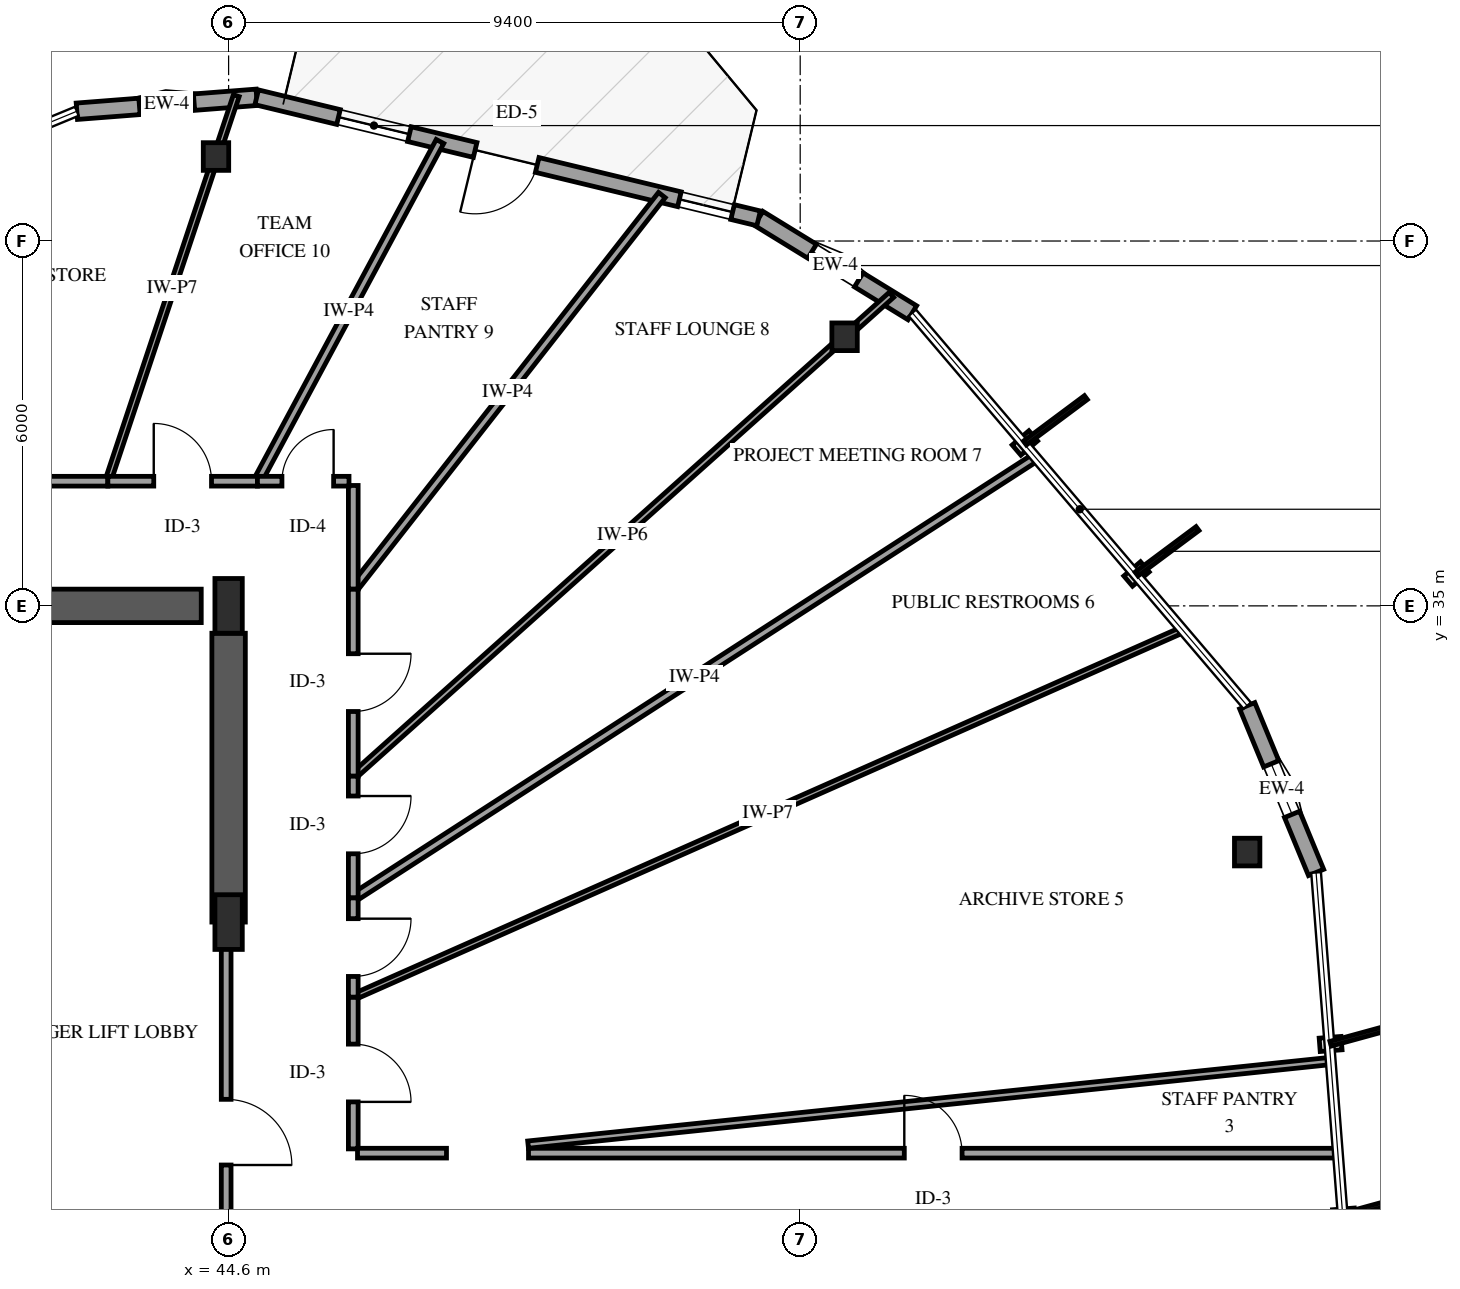
"""IFC4 building model, lengths in metres.
Left out: names, types, materials, properties, quantities, classifications, styles, units other than length and angle.
Written with IfcOpenShell. Run it as: python <this file> out.ifc"""

import sys

from ifc_helpers import new_model, si_unit, direction, frame, frame_2d, origin, origin_2d, place, context, subcontext, project, spatial, rectangle, i_section, extrude, element, fill, save


model = new_model("IFC4")
c1 = context("Model", 3, precision=1e-05, world=origin(), true_north=direction((0.0, 1.0)))
c2 = subcontext(c1, "Body", "Model", "MODEL_VIEW")
j1 = project(units=[si_unit("LENGTHUNIT", "METRE"), si_unit("PLANEANGLEUNIT", "RADIAN")], contexts=[c1])
p1 = place(None, origin())
s1 = spatial("IfcSite", under=j1, at=p1, CompositionType="ELEMENT")
p2 = place(p1, origin())
s2 = spatial("IfcBuilding", under=s1, at=p2, CompositionType="ELEMENT")
p3 = place(p2, frame((0.0, 0.0, 114.7)))
s3 = spatial("IfcBuildingStorey", under=s2, at=p3, CompositionType="ELEMENT", Elevation=114.7)
p4 = place(p3, frame((41.3, 35.0, 0.0), z_axis=(0.0, 0.0, 1.0), x_axis=(1.0, 0.0, 0.0)))
e1 = element("IfcWall", 1, at=p4, inside=s3, PredefinedType="SHEAR", context=c2, shape_type="SweptSolid", body=[
    extrude(rectangle(XDim=2.85, YDim=0.55, at=frame_2d((1.425, 0.0))), origin(), (0.0, 0.0, 1.0), 3.9),
])
p5 = place(p3, frame((44.6, 29.8, 0.0), z_axis=(0.0, 0.0, 1.0), x_axis=(0.0, 1.0, 0.0)))
e2 = element("IfcWall", 2, at=p5, inside=s3, PredefinedType="SHEAR", context=c2, shape_type="SweptSolid", body=[
    extrude(rectangle(XDim=4.75, YDim=0.55, at=frame_2d((2.375, 0.0))), origin(), (0.0, 0.0, 1.0), 3.9),
])
for number, where, z_axis, x_axis in (
    (3, (44.6, 29.8, 0.0), (0.0, 0.0, 1.0), (1.0, 0.0, 0.0)),
    (4, (44.6, 35.0, 0.0), (0.0, 0.0, 1.0), (1.0, 0.0, 0.0)),
):
    element("IfcColumn", number, at=place(p3, frame(where, z_axis=z_axis, x_axis=x_axis)), inside=s3, PredefinedType="PILASTER", context=c2, shape_type="SweptSolid", body=[
        extrude(rectangle(XDim=0.45, YDim=0.9, at=origin_2d()), origin(), (0.0, 0.0, 1.0), 3.9),
    ])
for number, where, z_axis, x_axis in (
    (5, (61.351, 30.951, 0.0), (0.0, 0.0, 1.0), (1.0, 0.0, 0.0)),
    (6, (54.73, 39.425, 0.0), (0.0, 0.0, 1.0), (1.0, 0.0, 0.0)),
    (7, (44.393, 42.389, 0.0), (0.0, 0.0, 1.0), (1.0, 0.0, 0.0)),
):
    element("IfcColumn", number, at=place(p3, frame(where, z_axis=z_axis, x_axis=x_axis)), inside=s3, PredefinedType="COLUMN", context=c2, shape_type="SweptSolid", body=[
        extrude(i_section(OverallWidth=0.418, OverallDepth=0.455, WebThickness=0.042, FlangeThickness=0.068, FilletRadius=0.038, at=origin_2d()), origin(), (0.0, 0.0, 1.0), 3.9),
    ])
p6 = place(p3, frame((55.844, 39.82, 0.0), z_axis=(0.0, 0.0, 1.0), x_axis=(-0.852087521371, 0.523399327402, 0.0)))
e8 = element("IfcWall", 8, at=p6, inside=s3, PredefinedType="SOLIDWALL", context=c2, shape_type="SweptSolid", body=[
    extrude(rectangle(XDim=2.967, YDim=0.27, at=frame_2d((1.483, 0.0))), origin(), (0.0, 0.0, 1.0), 2.979),
])
p7 = place(p6, frame((1.033, 0.0, 0.75)))
e9 = element("IfcOpeningElement", 9, at=p7, cuts=e8, PredefinedType="OPENING", context=c2, shape_type="SweptSolid", body=[
    extrude(rectangle(XDim=0.9, YDim=1.5, at=frame_2d((0.45, 0.75))), frame((0.0, 0.145, 0.0), z_axis=(0.0, -1.0, 0.0), x_axis=(1.0, 0.0, 0.0)), (0.0, 0.0, 1.0), 0.29),
])
p8 = place(p3, frame((45.062, 43.364, 0.0), z_axis=(0.0, 0.0, 1.0), x_axis=(-0.99699708695, -0.077439063873, 0.0)))
e10 = element("IfcWall", 10, at=p8, inside=s3, PredefinedType="SOLIDWALL", context=c2, shape_type="SweptSolid", body=[
    extrude(rectangle(XDim=2.967, YDim=0.27, at=frame_2d((1.483, 0.0))), origin(), (0.0, 0.0, 1.0), 2.979),
])
p9 = place(p8, frame((1.033, 0.0, 0.75)))
e11 = element("IfcOpeningElement", 11, at=p9, cuts=e10, PredefinedType="OPENING", context=c2, shape_type="SweptSolid", body=[
    extrude(rectangle(XDim=0.9, YDim=1.5, at=frame_2d((0.45, 0.75))), frame((0.0, 0.145, 0.0), z_axis=(0.0, -1.0, 0.0), x_axis=(1.0, 0.0, 0.0)), (0.0, 0.0, 1.0), 0.29),
])
p10 = place(p3, frame((53.316, 41.373, 0.0), z_axis=(0.0, 0.0, 1.0), x_axis=(-0.972125162173, 0.234462511014, 0.0)))
e12 = element("IfcWall", 12, at=p10, inside=s3, PredefinedType="SOLIDWALL", context=c2, shape_type="SweptSolid", body=[
    extrude(rectangle(XDim=8.49, YDim=0.25, at=frame_2d((4.245, 0.0))), origin(), (0.0, 0.0, 1.0), 2.979),
])
p11 = place(p10, frame((3.745, 0.0, 0.0)))
e13 = element("IfcOpeningElement", 13, at=p11, cuts=e12, PredefinedType="OPENING", context=c2, shape_type="SweptSolid", body=[
    extrude(rectangle(XDim=1.05, YDim=2.15, at=frame_2d((0.525, 1.075))), frame((0.0, 0.135, 0.0), z_axis=(0.0, -1.0, 0.0), x_axis=(1.0, 0.0, 0.0)), (0.0, 0.0, 1.0), 0.27),
])
p12 = place(p10, frame((0.44, 0.0, 0.72)))
e14 = element("IfcOpeningElement", 14, at=p12, cuts=e12, PredefinedType="OPENING", context=c2, shape_type="SweptSolid", body=[
    extrude(rectangle(XDim=0.9, YDim=1.5, at=frame_2d((0.45, 0.75))), frame((0.0, 0.135, 0.0), z_axis=(0.0, -1.0, 0.0), x_axis=(1.0, 0.0, 0.0)), (0.0, 0.0, 1.0), 0.27),
])
p13 = place(p10, frame((5.907, 0.0, 0.72)))
e15 = element("IfcOpeningElement", 15, at=p13, cuts=e12, PredefinedType="OPENING", context=c2, shape_type="SweptSolid", body=[
    extrude(rectangle(XDim=1.2, YDim=1.6, at=frame_2d((0.6, 0.8))), frame((0.0, 0.135, 0.0), z_axis=(0.0, -1.0, 0.0), x_axis=(1.0, 0.0, 0.0)), (0.0, 0.0, 1.0), 0.27),
])
p14 = place(p3, frame((62.484, 30.616, 0.0), z_axis=(0.0, 0.0, 1.0), x_axis=(-0.381767795874, 0.9242582702, 0.0)))
e16 = element("IfcWall", 16, at=p14, inside=s3, PredefinedType="SOLIDWALL", context=c2, shape_type="SweptSolid", body=[
    extrude(rectangle(XDim=2.967, YDim=0.27, at=frame_2d((1.483, 0.0))), origin(), (0.0, 0.0, 1.0), 2.979),
])
p15 = place(p14, frame((1.033, 0.0, 0.75)))
e17 = element("IfcOpeningElement", 17, at=p15, cuts=e16, PredefinedType="OPENING", context=c2, shape_type="SweptSolid", body=[
    extrude(rectangle(XDim=0.9, YDim=1.5, at=frame_2d((0.45, 0.75))), frame((0.0, 0.145, 0.0), z_axis=(0.0, -1.0, 0.0), x_axis=(1.0, 0.0, 0.0)), (0.0, 0.0, 1.0), 0.29),
])
p16 = place(p3, frame((46.65, 28.566, 0.0), z_axis=(0.0, 0.0, 1.0), x_axis=(0.914342636825, 0.404941406234, 0.0)))
e18 = element("IfcWall", 18, at=p16, inside=s3, PredefinedType="PARTITIONING", context=c2, shape_type="SweptSolid", body=[
    extrude(rectangle(XDim=14.916, YDim=0.1, at=frame_2d((7.458, 0.0))), origin(), (0.0, 0.0, 1.0), 3.6),
])
p17 = place(p3, frame((46.65, 30.197, 0.0), z_axis=(0.0, 0.0, 1.0), x_axis=(0.840112606946, 0.542412027569, 0.0)))
e19 = element("IfcWall", 19, at=p17, inside=s3, PredefinedType="PARTITIONING", context=c2, shape_type="SweptSolid", body=[
    extrude(rectangle(XDim=13.357, YDim=0.14, at=frame_2d((6.678, 0.0))), origin(), (0.0, 0.0, 1.0), 3.6),
])
p18 = place(p3, frame((49.532, 26.0, 0.0), z_axis=(0.0, 0.0, 1.0), x_axis=(1.0, 0.0, 0.0)))
e20 = element("IfcWall", 20, at=p18, inside=s3, PredefinedType="PARTITIONING", context=c2, shape_type="SweptSolid", body=[
    extrude(rectangle(XDim=13.31, YDim=0.16, at=frame_2d((6.655, 0.0))), origin(), (0.0, 0.0, 1.0), 3.6),
])
p19 = place(p18, frame((6.18, 0.0, 0.0)))
e21 = element("IfcOpeningElement", 21, at=p19, cuts=e20, PredefinedType="OPENING", context=c2, shape_type="SweptSolid", body=[
    extrude(rectangle(XDim=0.95, YDim=2.15, at=frame_2d((0.475, 1.075))), frame((0.0, 0.09, 0.0), z_axis=(0.0, -1.0, 0.0), x_axis=(1.0, 0.0, 0.0)), (0.0, 0.0, 1.0), 0.18),
])
p20 = place(p3, frame((49.525, 26.14, 0.0), z_axis=(0.0, 0.0, 1.0), x_axis=(0.994608293381, 0.103703147192, 0.0)))
e22 = element("IfcWall", 22, at=p20, inside=s3, PredefinedType="PARTITIONING", context=c2, shape_type="SweptSolid", body=[
    extrude(rectangle(XDim=13.271, YDim=0.12, at=frame_2d((6.635, 0.0))), origin(), (0.0, 0.0, 1.0), 3.6),
])
p21 = place(p3, frame((46.65, 32.199, 0.0), z_axis=(0.0, 0.0, 1.0), x_axis=(0.745386497936, 0.666632558982, 0.0)))
e23 = element("IfcWall", 23, at=p21, inside=s3, PredefinedType="PARTITIONING", context=c2, shape_type="SweptSolid", body=[
    extrude(rectangle(XDim=11.873, YDim=0.11, at=frame_2d((5.937, 0.0))), origin(), (0.0, 0.0, 1.0), 2.978),
])
p22 = place(p3, frame((46.65, 35.277, 0.0), z_axis=(0.0, 0.0, 1.0), x_axis=(0.616660136887, 0.787229493588, 0.0)))
e24 = element("IfcWall", 24, at=p22, inside=s3, PredefinedType="PARTITIONING", context=c2, shape_type="SweptSolid", body=[
    extrude(rectangle(XDim=8.23, YDim=0.14, at=frame_2d((4.115, 0.0))), origin(), (0.0, 0.0, 1.0), 2.978),
])
p23 = place(p3, frame((44.56, 29.8, 0.0), z_axis=(0.0, 0.0, 1.0), x_axis=(0.0, -1.0, 0.0)))
e25 = element("IfcWall", 25, at=p23, inside=s3, PredefinedType="PARTITIONING", context=c2, shape_type="SweptSolid", body=[
    extrude(rectangle(XDim=6.91, YDim=0.16, at=frame_2d((3.455, 0.0))), origin(), (0.0, 0.0, 1.0), 2.64),
])
p24 = place(p23, frame((2.915, 0.0, 0.0)))
e26 = element("IfcOpeningElement", 26, at=p24, cuts=e25, PredefinedType="OPENING", context=c2, shape_type="SweptSolid", body=[
    extrude(rectangle(XDim=1.08, YDim=2.15, at=frame_2d((0.54, 1.075))), frame((0.0, 0.09, 0.0), z_axis=(0.0, -1.0, 0.0), x_axis=(1.0, 0.0, 0.0)), (0.0, 0.0, 1.0), 0.18),
])
p25 = place(p3, frame((42.614, 37.05, 0.0), z_axis=(0.0, 0.0, 1.0), x_axis=(0.316063354252, 0.948738086143, 0.0)))
e27 = element("IfcWall", 27, at=p25, inside=s3, PredefinedType="PARTITIONING", context=c2, shape_type="SweptSolid", body=[
    extrude(rectangle(XDim=6.682, YDim=0.1, at=frame_2d((3.341, 0.0))), origin(), (0.0, 0.0, 1.0), 2.895),
])
p26 = place(p3, frame((45.074, 37.05, 0.0), z_axis=(0.0, 0.0, 1.0), x_axis=(0.473319167136, 0.880891006891, 0.0)))
e28 = element("IfcWall", 28, at=p26, inside=s3, PredefinedType="PARTITIONING", context=c2, shape_type="SweptSolid", body=[
    extrude(rectangle(XDim=6.342, YDim=0.14, at=frame_2d((3.171, 0.0))), origin(), (0.0, 0.0, 1.0), 2.974),
])
p27 = place(p3, frame((38.324, 37.05, 0.0), z_axis=(0.0, 0.0, 1.0), x_axis=(1.0, 0.0, 0.0)))
e29 = element("IfcWall", 29, at=p27, inside=s3, PredefinedType="PARTITIONING", context=c2, shape_type="SweptSolid", body=[
    extrude(rectangle(XDim=4.29, YDim=0.16, at=frame_2d((2.145, 0.0))), origin(), (0.0, 0.0, 1.0), 3.6),
])
p28 = place(p27, frame((1.67, 0.0, 0.0)))
e30 = element("IfcOpeningElement", 30, at=p28, cuts=e29, PredefinedType="OPENING", context=c2, shape_type="SweptSolid", body=[
    extrude(rectangle(XDim=0.95, YDim=2.15, at=frame_2d((0.475, 1.075))), frame((0.0, 0.09, 0.0), z_axis=(0.0, -1.0, 0.0), x_axis=(1.0, 0.0, 0.0)), (0.0, 0.0, 1.0), 0.18),
])
p29 = place(p3, frame((46.65, 35.277, 0.0), z_axis=(0.0, 0.0, 1.0), x_axis=(0.0, -1.0, 0.0)))
e31 = element("IfcWall", 31, at=p29, inside=s3, PredefinedType="PARTITIONING", context=c2, shape_type="SweptSolid", body=[
    extrude(rectangle(XDim=3.078, YDim=0.16, at=frame_2d((1.539, 0.0))), origin(), (0.0, 0.0, 1.0), 3.6),
])
p30 = place(p29, frame((1.064, 0.0, 0.0)))
e32 = element("IfcOpeningElement", 32, at=p30, cuts=e31, PredefinedType="OPENING", context=c2, shape_type="SweptSolid", body=[
    extrude(rectangle(XDim=0.95, YDim=2.15, at=frame_2d((0.475, 1.075))), frame((0.0, 0.09, 0.0), z_axis=(0.0, -1.0, 0.0), x_axis=(1.0, 0.0, 0.0)), (0.0, 0.0, 1.0), 0.18),
])
p31 = place(p3, frame((46.65, 28.566, 0.0), z_axis=(0.0, 0.0, 1.0), x_axis=(0.0, -1.0, 0.0)))
e33 = element("IfcWall", 33, at=p31, inside=s3, PredefinedType="PARTITIONING", context=c2, shape_type="SweptSolid", body=[
    extrude(rectangle(XDim=2.496, YDim=0.16, at=frame_2d((1.248, 0.0))), origin(), (0.0, 0.0, 1.0), 3.6),
])
p32 = place(p31, frame((0.773, 0.0, 0.0)))
e34 = element("IfcOpeningElement", 34, at=p32, cuts=e33, PredefinedType="OPENING", context=c2, shape_type="SweptSolid", body=[
    extrude(rectangle(XDim=0.95, YDim=2.15, at=frame_2d((0.475, 1.075))), frame((0.0, 0.09, 0.0), z_axis=(0.0, -1.0, 0.0), x_axis=(1.0, 0.0, 0.0)), (0.0, 0.0, 1.0), 0.18),
])
p33 = place(p3, frame((42.614, 37.05, 0.0), z_axis=(0.0, 0.0, 1.0), x_axis=(1.0, 0.0, 0.0)))
e35 = element("IfcWall", 35, at=p33, inside=s3, PredefinedType="PARTITIONING", context=c2, shape_type="SweptSolid", body=[
    extrude(rectangle(XDim=2.46, YDim=0.16, at=frame_2d((1.23, 0.0))), origin(), (0.0, 0.0, 1.0), 3.6),
])
p34 = place(p33, frame((0.755, 0.0, 0.0)))
e36 = element("IfcOpeningElement", 36, at=p34, cuts=e35, PredefinedType="OPENING", context=c2, shape_type="SweptSolid", body=[
    extrude(rectangle(XDim=0.95, YDim=2.15, at=frame_2d((0.475, 1.075))), frame((0.0, 0.09, 0.0), z_axis=(0.0, -1.0, 0.0), x_axis=(1.0, 0.0, 0.0)), (0.0, 0.0, 1.0), 0.18),
])
p35 = place(p3, frame((46.65, 32.199, 0.0), z_axis=(0.0, 0.0, 1.0), x_axis=(0.0, -1.0, 0.0)))
e37 = element("IfcWall", 37, at=p35, inside=s3, PredefinedType="PARTITIONING", context=c2, shape_type="SweptSolid", body=[
    extrude(rectangle(XDim=2.002, YDim=0.16, at=frame_2d((1.001, 0.0))), origin(), (0.0, 0.0, 1.0), 3.6),
])
p36 = place(p35, frame((0.326, 0.0, 0.0)))
e38 = element("IfcOpeningElement", 38, at=p36, cuts=e37, PredefinedType="OPENING", context=c2, shape_type="SweptSolid", body=[
    extrude(rectangle(XDim=0.95, YDim=2.15, at=frame_2d((0.475, 1.075))), frame((0.0, 0.09, 0.0), z_axis=(0.0, -1.0, 0.0), x_axis=(1.0, 0.0, 0.0)), (0.0, 0.0, 1.0), 0.18),
])
p37 = place(p3, frame((46.65, 36.98, 0.0), z_axis=(0.0, 0.0, 1.0), x_axis=(0.0, -1.0, 0.0)))
e39 = element("IfcWall", 39, at=p37, inside=s3, PredefinedType="PARTITIONING", context=c2, shape_type="SweptSolid", body=[
    extrude(rectangle(XDim=1.703, YDim=0.16, at=frame_2d((0.852, 0.0))), origin(), (0.0, 0.0, 1.0), 3.6),
])
p38 = place(p3, frame((46.65, 30.197, 0.0), z_axis=(0.0, 0.0, 1.0), x_axis=(0.0, -1.0, 0.0)))
e40 = element("IfcWall", 40, at=p38, inside=s3, PredefinedType="PARTITIONING", context=c2, shape_type="SweptSolid", body=[
    extrude(rectangle(XDim=1.631, YDim=0.16, at=frame_2d((0.815, 0.0))), origin(), (0.0, 0.0, 1.0), 3.6),
])
p39 = place(p38, frame((0.341, 0.0, 0.0)))
e41 = element("IfcOpeningElement", 41, at=p39, cuts=e40, PredefinedType="OPENING", context=c2, shape_type="SweptSolid", body=[
    extrude(rectangle(XDim=0.95, YDim=2.15, at=frame_2d((0.475, 1.075))), frame((0.0, 0.09, 0.0), z_axis=(0.0, -1.0, 0.0), x_axis=(1.0, 0.0, 0.0)), (0.0, 0.0, 1.0), 0.18),
])
p40 = place(p3, frame((45.074, 37.05, 0.0), z_axis=(0.0, 0.0, 1.0), x_axis=(1.0, 0.0, 0.0)))
e42 = element("IfcWall", 42, at=p40, inside=s3, PredefinedType="PARTITIONING", context=c2, shape_type="SweptSolid", body=[
    extrude(rectangle(XDim=1.506, YDim=0.16, at=frame_2d((0.753, 0.0))), origin(), (0.0, 0.0, 1.0), 3.6),
])
p41 = place(p40, frame((0.403, 0.0, 0.0)))
e43 = element("IfcOpeningElement", 43, at=p41, cuts=e42, PredefinedType="OPENING", context=c2, shape_type="SweptSolid", body=[
    extrude(rectangle(XDim=0.85, YDim=2.1, at=frame_2d((0.425, 1.05))), frame((0.0, 0.09, 0.0), z_axis=(0.0, -1.0, 0.0), x_axis=(1.0, 0.0, 0.0)), (0.0, 0.0, 1.0), 0.18),
])
p42 = place(p3, frame((46.72, 26.0, 0.0), z_axis=(0.0, 0.0, 1.0), x_axis=(1.0, 0.0, 0.0)))
e44 = element("IfcWall", 44, at=p42, inside=s3, PredefinedType="PARTITIONING", context=c2, shape_type="SweptSolid", body=[
    extrude(rectangle(XDim=1.463, YDim=0.16, at=frame_2d((0.731, 0.0))), origin(), (0.0, 0.0, 1.0), 3.6),
])
p43 = place(p7, origin())
e45 = element("IfcWindow", 45, at=p43, inside=s3, PartitioningType="SINGLE_PANEL", PredefinedType="WINDOW", context=c2, shape_type="SweptSolid", body=[
    extrude(rectangle(XDim=0.9, YDim=1.5, at=frame_2d((0.45, 0.75))), frame((0.0, 0.03, 0.0), z_axis=(0.0, -1.0, 0.0), x_axis=(1.0, 0.0, 0.0)), (0.0, 0.0, 1.0), 0.06),
])
fill(e9, e45)
p44 = place(p9, origin())
e46 = element("IfcWindow", 46, at=p44, inside=s3, PartitioningType="SINGLE_PANEL", PredefinedType="WINDOW", context=c2, shape_type="SweptSolid", body=[
    extrude(rectangle(XDim=0.9, YDim=1.5, at=frame_2d((0.45, 0.75))), frame((0.0, 0.03, 0.0), z_axis=(0.0, -1.0, 0.0), x_axis=(1.0, 0.0, 0.0)), (0.0, 0.0, 1.0), 0.06),
])
fill(e11, e46)
p45 = place(p11, origin())
e47 = element("IfcDoor", 47, at=p45, inside=s3, OperationType="SINGLE_SWING_RIGHT", PredefinedType="DOOR", context=c2, shape_type="SweptSolid", body=[
    extrude(rectangle(XDim=1.05, YDim=2.15, at=frame_2d((0.525, 1.075))), frame((0.0, 0.025, 0.0), z_axis=(0.0, -1.0, 0.0), x_axis=(1.0, 0.0, 0.0)), (0.0, 0.0, 1.0), 0.05),
])
fill(e13, e47)
p46 = place(p12, origin())
e48 = element("IfcWindow", 48, at=p46, inside=s3, PartitioningType="SINGLE_PANEL", PredefinedType="WINDOW", context=c2, shape_type="SweptSolid", body=[
    extrude(rectangle(XDim=0.9, YDim=1.5, at=frame_2d((0.45, 0.75))), frame((0.0, 0.03, 0.0), z_axis=(0.0, -1.0, 0.0), x_axis=(1.0, 0.0, 0.0)), (0.0, 0.0, 1.0), 0.06),
])
fill(e14, e48)
p47 = place(p13, origin())
e49 = element("IfcWindow", 49, at=p47, inside=s3, PartitioningType="SINGLE_PANEL", PredefinedType="WINDOW", context=c2, shape_type="SweptSolid", body=[
    extrude(rectangle(XDim=1.2, YDim=1.6, at=frame_2d((0.6, 0.8))), frame((0.0, 0.03, 0.0), z_axis=(0.0, -1.0, 0.0), x_axis=(1.0, 0.0, 0.0)), (0.0, 0.0, 1.0), 0.06),
])
fill(e15, e49)
p48 = place(p15, origin())
e50 = element("IfcWindow", 50, at=p48, inside=s3, PartitioningType="SINGLE_PANEL", PredefinedType="WINDOW", context=c2, shape_type="SweptSolid", body=[
    extrude(rectangle(XDim=0.9, YDim=1.5, at=frame_2d((0.45, 0.75))), frame((0.0, 0.03, 0.0), z_axis=(0.0, -1.0, 0.0), x_axis=(1.0, 0.0, 0.0)), (0.0, 0.0, 1.0), 0.06),
])
fill(e17, e50)
p49 = place(p19, origin())
e51 = element("IfcDoor", 51, at=p49, inside=s3, OperationType="SINGLE_SWING_LEFT", PredefinedType="DOOR", context=c2, shape_type="SweptSolid", body=[
    extrude(rectangle(XDim=0.95, YDim=2.15, at=frame_2d((0.475, 1.075))), frame((0.0, 0.025, 0.0), z_axis=(0.0, -1.0, 0.0), x_axis=(1.0, 0.0, 0.0)), (0.0, 0.0, 1.0), 0.05),
])
fill(e21, e51)
p50 = place(p24, origin())
e52 = element("IfcDoor", 52, at=p50, inside=s3, OperationType="SINGLE_SWING_RIGHT", PredefinedType="DOOR", context=c2, shape_type="SweptSolid", body=[
    extrude(rectangle(XDim=1.08, YDim=2.15, at=frame_2d((0.54, 1.075))), frame((0.0, 0.025, 0.0), z_axis=(0.0, -1.0, 0.0), x_axis=(1.0, 0.0, 0.0)), (0.0, 0.0, 1.0), 0.05),
])
fill(e26, e52)
p51 = place(p30, origin())
e53 = element("IfcDoor", 53, at=p51, inside=s3, OperationType="SINGLE_SWING_LEFT", PredefinedType="DOOR", context=c2, shape_type="SweptSolid", body=[
    extrude(rectangle(XDim=0.95, YDim=2.15, at=frame_2d((0.475, 1.075))), frame((0.0, 0.025, 0.0), z_axis=(0.0, -1.0, 0.0), x_axis=(1.0, 0.0, 0.0)), (0.0, 0.0, 1.0), 0.05),
])
fill(e32, e53)
p52 = place(p32, origin())
e54 = element("IfcDoor", 54, at=p52, inside=s3, OperationType="SINGLE_SWING_RIGHT", PredefinedType="DOOR", context=c2, shape_type="SweptSolid", body=[
    extrude(rectangle(XDim=0.95, YDim=2.15, at=frame_2d((0.475, 1.075))), frame((0.0, 0.025, 0.0), z_axis=(0.0, -1.0, 0.0), x_axis=(1.0, 0.0, 0.0)), (0.0, 0.0, 1.0), 0.05),
])
fill(e34, e54)
p53 = place(p34, origin())
e55 = element("IfcDoor", 55, at=p53, inside=s3, OperationType="SINGLE_SWING_LEFT", PredefinedType="DOOR", context=c2, shape_type="SweptSolid", body=[
    extrude(rectangle(XDim=0.95, YDim=2.15, at=frame_2d((0.475, 1.075))), frame((0.0, 0.025, 0.0), z_axis=(0.0, -1.0, 0.0), x_axis=(1.0, 0.0, 0.0)), (0.0, 0.0, 1.0), 0.05),
])
fill(e36, e55)
p54 = place(p36, origin())
e56 = element("IfcDoor", 56, at=p54, inside=s3, OperationType="SINGLE_SWING_LEFT", PredefinedType="DOOR", context=c2, shape_type="SweptSolid", body=[
    extrude(rectangle(XDim=0.95, YDim=2.15, at=frame_2d((0.475, 1.075))), frame((0.0, 0.025, 0.0), z_axis=(0.0, -1.0, 0.0), x_axis=(1.0, 0.0, 0.0)), (0.0, 0.0, 1.0), 0.05),
])
fill(e38, e56)
p55 = place(p39, origin())
e57 = element("IfcDoor", 57, at=p55, inside=s3, OperationType="SINGLE_SWING_LEFT", PredefinedType="DOOR", context=c2, shape_type="SweptSolid", body=[
    extrude(rectangle(XDim=0.95, YDim=2.15, at=frame_2d((0.475, 1.075))), frame((0.0, 0.025, 0.0), z_axis=(0.0, -1.0, 0.0), x_axis=(1.0, 0.0, 0.0)), (0.0, 0.0, 1.0), 0.05),
])
fill(e41, e57)
p56 = place(p41, origin())
e58 = element("IfcDoor", 58, at=p56, inside=s3, OperationType="SINGLE_SWING_RIGHT", PredefinedType="DOOR", context=c2, shape_type="SweptSolid", body=[
    extrude(rectangle(XDim=0.85, YDim=2.1, at=frame_2d((0.425, 1.05))), frame((0.0, 0.025, 0.0), z_axis=(0.0, -1.0, 0.0), x_axis=(1.0, 0.0, 0.0)), (0.0, 0.0, 1.0), 0.05),
])
fill(e43, e58)
save(model, sys.argv[1])
